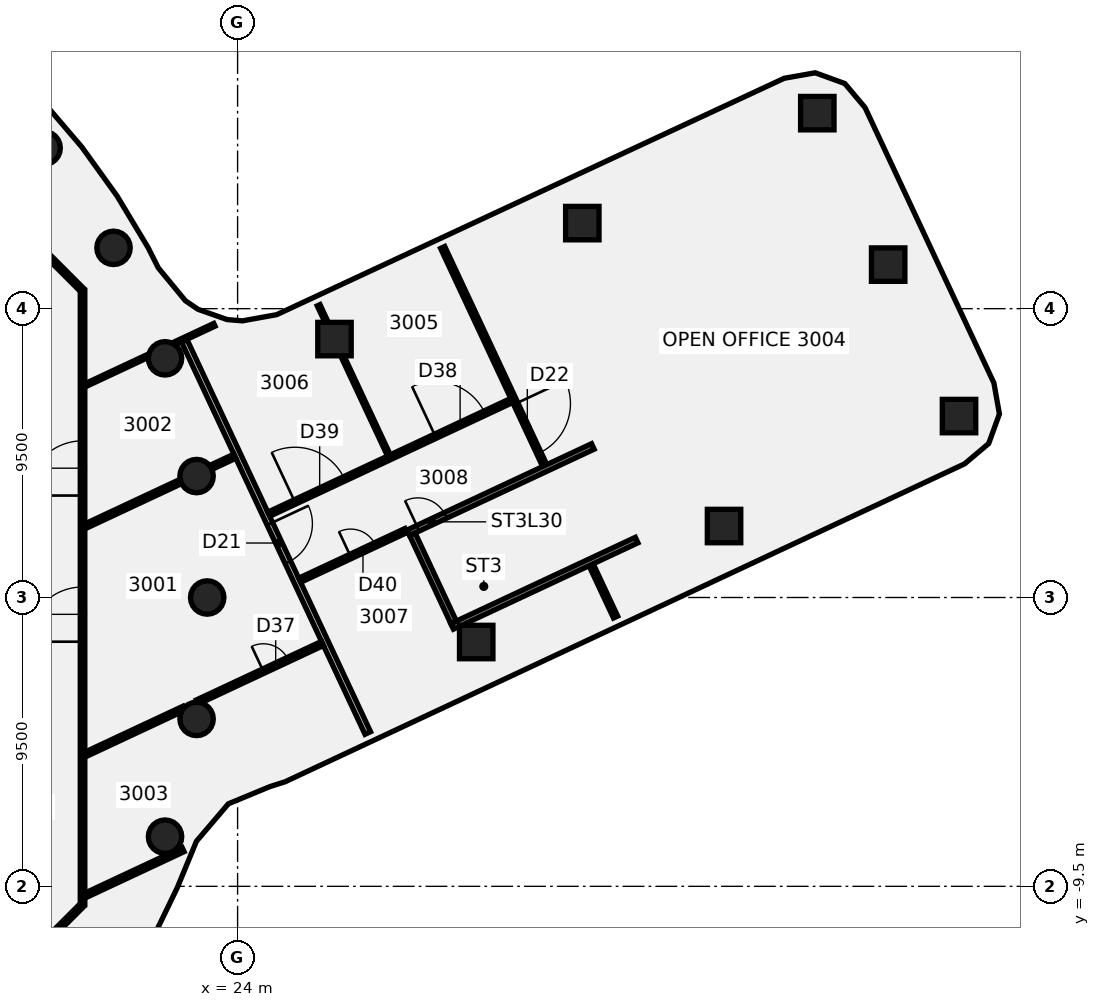
"""IFC4 building model, lengths in metres.
Left out: names, types, materials, properties, quantities, classifications, styles, units other than length and angle.
Written with IfcOpenShell. Run it as: python <this file> out.ifc"""

import sys

from ifc_helpers import new_model, si_unit, direction, frame, frame_2d, origin, origin_2d, place, context, subcontext, project, spatial, polyline, rectangle, circle, outline, extrude, element, fill, save


model = new_model("IFC4")
c1 = context("Model", 3, precision=1e-05, world=origin(), true_north=direction((0.0, 1.0)))
c2 = subcontext(c1, "Body", "Model", "MODEL_VIEW")
j1 = project(units=[si_unit("LENGTHUNIT", "METRE"), si_unit("PLANEANGLEUNIT", "RADIAN")], contexts=[c1])
p1 = place(None, origin())
s1 = spatial("IfcSite", under=j1, at=p1, CompositionType="ELEMENT")
p2 = place(p1, origin())
s2 = spatial("IfcBuilding", under=s1, at=p2, CompositionType="ELEMENT")
p3 = place(p2, frame((0.0, 0.0, 124.75)))
s3 = spatial("IfcBuildingStorey", under=s2, at=p3, CompositionType="ELEMENT", Elevation=124.75)
for number, where, z_axis, x_axis in (
    (1, (23.0, 0.0, -0.14), (0.0, 0.0, 1.0), (1.0, 0.0, 0.0)),
    (2, (22.651, 3.994, -0.14), (0.0, 0.0, 1.0), (1.0, 0.0, 0.0)),
    (3, (21.613, 7.866, -0.14), (0.0, 0.0, 1.0), (1.0, 0.0, 0.0)),
    (4, (19.919, 11.5, -0.14), (0.0, 0.0, 1.0), (1.0, 0.0, 0.0)),
    (5, (17.619, 14.784, -0.14), (0.0, 0.0, 1.0), (1.0, 0.0, 0.0)),
    (6, (21.613, -7.866, -0.14), (0.0, 0.0, 1.0), (1.0, 0.0, 0.0)),
    (7, (22.651, -3.994, -0.14), (0.0, 0.0, 1.0), (1.0, 0.0, 0.0)),
):
    element("IfcColumn", number, at=place(p3, frame(where, z_axis=z_axis, x_axis=x_axis)), inside=s3, PredefinedType="COLUMN", context=c2, shape_type="SweptSolid", body=[
        extrude(circle(Radius=0.55, at=origin_2d()), origin(), (0.0, 0.0, 1.0), 3.71),
    ])
p4 = place(p3, frame((35.338, 12.314, -0.138), z_axis=(-0.060824433029, 0.064699855868, 0.9960493547), x_axis=(0.421197702581, -0.903035286049, 0.084378714676)))
e8 = element("IfcColumn", 8, at=p4, inside=s3, PredefinedType="COLUMN", context=c2, shape_type="SweptSolid", body=[
    extrude(rectangle(XDim=1.1, YDim=1.1, at=origin_2d()), origin(), (0.0, 0.0, 1.0), 3.717),
])
p5 = place(p3, frame((40.0, 2.35, -0.138), z_axis=(-0.012351142794, 0.088034741194, 0.996040829291), x_axis=(-0.905727436668, -0.423052547946, 0.026160125068)))
e9 = element("IfcColumn", 9, at=p5, inside=s3, PredefinedType="COLUMN", context=c2, shape_type="SweptSolid", body=[
    extrude(rectangle(XDim=1.1, YDim=1.1, at=origin_2d()), origin(), (0.0, 0.0, 1.0), 3.716),
])
p6 = place(p3, frame((27.187, 8.499, -0.139), z_axis=(-0.041932325564, 0.025080401947, 0.998805613476), x_axis=(0.422762183328, -0.905336041768, 0.040481944421)))
e10 = element("IfcColumn", 10, at=p6, inside=s3, PredefinedType="COLUMN", context=c2, shape_type="SweptSolid", body=[
    extrude(rectangle(XDim=1.1, YDim=1.1, at=origin_2d()), origin(), (0.0, 0.0, 1.0), 3.709),
])
p7 = place(p3, frame((31.849, -1.464, -0.139), z_axis=(0.00678071338, 0.048386644022, 0.998805664084), x_axis=(-0.905990074096, -0.422461295082, 0.026616532396)))
e11 = element("IfcColumn", 11, at=p7, inside=s3, PredefinedType="COLUMN", context=c2, shape_type="SweptSolid", body=[
    extrude(rectangle(XDim=1.1, YDim=1.1, at=origin_2d()), origin(), (0.0, 0.0, 1.0), 3.708),
])
p8 = place(p3, frame((47.73, 5.967, -0.138), z_axis=(-0.019038669148, 0.130588259864, 0.991253870339), x_axis=(-0.905941901453, -0.421679598548, 0.038152160609)))
e12 = element("IfcColumn", 12, at=p8, inside=s3, PredefinedType="COLUMN", context=c2, shape_type="SweptSolid", body=[
    extrude(rectangle(XDim=1.1, YDim=1.1, at=origin_2d()), origin(), (0.0, 0.0, 1.0), 3.732),
])
p9 = place(p3, frame((45.399, 10.949, -0.138), z_axis=(-0.043196128411, 0.119116596528, 0.991940185153), x_axis=(-0.905970442825, -0.423188341029, 0.011365946715)))
e13 = element("IfcColumn", 13, at=p9, inside=s3, PredefinedType="COLUMN", context=c2, shape_type="SweptSolid", body=[
    extrude(rectangle(XDim=1.1, YDim=1.1, at=origin_2d()), origin(), (0.0, 0.0, 1.0), 3.73),
])
p10 = place(p3, frame((43.068, 15.93, -0.138), z_axis=(-0.067336464177, 0.107515850964, 0.991920431478), x_axis=(0.419376139534, -0.899037513011, 0.125917448308)))
e14 = element("IfcColumn", 14, at=p10, inside=s3, PredefinedType="COLUMN", context=c2, shape_type="SweptSolid", body=[
    extrude(rectangle(XDim=1.1, YDim=1.1, at=origin_2d()), origin(), (0.0, 0.0, 1.0), 3.731),
])
p11 = place(p3, frame((22.246, 8.44, 0.0), z_axis=(0.0, 0.0, 1.0), x_axis=(0.423833272941, -0.905740225864, 0.0)))
e15 = element("IfcWall", 15, at=p11, inside=s3, PredefinedType="PARTITIONING", context=c2, shape_type="SweptSolid", body=[
    extrude(rectangle(XDim=14.239, YDim=0.2, at=frame_2d((7.119, 0.0))), origin(), (0.0, 0.0, 1.0), 2.87),
])
p12 = place(p11, frame((6.64, 0.0, 0.0)))
e16 = element("IfcOpeningElement", 16, at=p12, cuts=e15, PredefinedType="OPENING", context=c2, shape_type="SweptSolid", body=[
    extrude(rectangle(XDim=1.4, YDim=2.1, at=frame_2d((0.7, 1.05))), frame((0.0, 0.11, 0.0), z_axis=(0.0, -1.0, 0.0), x_axis=(1.0, 0.0, 0.0)), (0.0, 0.0, 1.0), 0.22),
])
p13 = place(p3, frame((26.666, 9.613, 0.0), z_axis=(0.0, 0.0, 1.0), x_axis=(0.423519130121, -0.905887159872, 0.0)))
e17 = element("IfcWall", 17, at=p13, inside=s3, PredefinedType="PARTITIONING", context=c2, shape_type="SweptSolid", body=[
    extrude(rectangle(XDim=0.506, YDim=0.1, at=frame_2d((0.253, 0.0))), origin(), (0.0, 0.0, 1.0), 2.97),
])
p14 = place(p3, frame((27.437, 7.964, 0.0), z_axis=(0.0, 0.0, 1.0), x_axis=(0.423841599809, -0.905736329332, 0.0)))
e18 = element("IfcWall", 18, at=p14, inside=s3, PredefinedType="PARTITIONING", context=c2, shape_type="SweptSolid", body=[
    extrude(rectangle(XDim=3.634, YDim=0.1, at=frame_2d((1.817, 0.0))), origin(), (0.0, 0.0, 1.0), 2.97),
])
p15 = place(p3, frame((30.745, 11.513, 0.0), z_axis=(0.0, 0.0, 1.0), x_axis=(0.423744952119, -0.905781549577, 0.0)))
e19 = element("IfcWall", 19, at=p15, inside=s3, PredefinedType="PARTITIONING", context=c2, shape_type="SweptSolid", body=[
    extrude(rectangle(XDim=7.882, YDim=0.15, at=frame_2d((3.941, 0.0))), origin(), (0.0, 0.0, 1.0), 2.97),
])
p16 = place(p15, frame((5.671, 0.0, 0.0)))
e20 = element("IfcOpeningElement", 20, at=p16, cuts=e19, PredefinedType="OPENING", context=c2, shape_type="SweptSolid", body=[
    extrude(rectangle(XDim=1.8, YDim=2.1, at=frame_2d((0.9, 1.05))), frame((0.0, 0.085, 0.0), z_axis=(0.0, -1.0, 0.0), x_axis=(1.0, 0.0, 0.0)), (0.0, 0.0, 1.0), 0.17),
])
p17 = place(p3, frame((35.645, 1.041, 0.0), z_axis=(0.0, 0.0, 1.0), x_axis=(0.423791120389, -0.905759949589, 0.0)))
e21 = element("IfcWall", 21, at=p17, inside=s3, PredefinedType="PARTITIONING", context=c2, shape_type="SweptSolid", body=[
    extrude(rectangle(XDim=1.859, YDim=0.15, at=frame_2d((0.93, 0.0))), origin(), (0.0, 0.0, 1.0), 2.97),
])
p18 = place(p3, frame((17.128, 11.872, 0.0), z_axis=(0.0, 0.0, 1.0), x_axis=(0.707106781187, -0.707106781187, 0.0)))
e22 = element("IfcWall", 22, at=p18, inside=s3, PredefinedType="PARTITIONING", context=c2, shape_type="SweptSolid", body=[
    extrude(rectangle(XDim=2.465, YDim=0.15, at=frame_2d((1.232, 0.0))), origin(), (0.0, 0.0, 1.0), 2.97),
])
p19 = place(p3, frame((18.99, -9.799, 0.0), z_axis=(0.0, 0.0, 1.0), x_axis=(0.905741880745, 0.42382973641, 0.0)))
e23 = element("IfcWall", 23, at=p19, inside=s3, PredefinedType="PARTITIONING", context=c2, shape_type="SweptSolid", body=[
    extrude(rectangle(XDim=3.552, YDim=0.15, at=frame_2d((1.776, 0.0))), origin(), (0.0, 0.0, 1.0), 2.97),
])
p20 = place(p3, frame((18.99, -5.162, 0.0), z_axis=(0.0, 0.0, 1.0), x_axis=(0.905759778977, 0.423791485034, 0.0)))
e24 = element("IfcWall", 24, at=p20, inside=s3, PredefinedType="PARTITIONING", context=c2, shape_type="SweptSolid", body=[
    extrude(rectangle(XDim=3.584, YDim=0.15, at=frame_2d((1.792, 0.0))), origin(), (0.0, 0.0, 1.0), 2.97),
])
p21 = place(p3, frame((22.671, -3.439, 0.0), z_axis=(0.0, 0.0, 1.0), x_axis=(0.905778318348, 0.423751859005, 0.0)))
e25 = element("IfcWall", 25, at=p21, inside=s3, PredefinedType="PARTITIONING", context=c2, shape_type="SweptSolid", body=[
    extrude(rectangle(XDim=4.55, YDim=0.15, at=frame_2d((2.275, 0.0))), origin(), (0.0, 0.0, 1.0), 2.97),
])
p22 = place(p21, frame((2.4, 0.0, 0.0)))
e26 = element("IfcOpeningElement", 26, at=p22, cuts=e25, PredefinedType="OPENING", context=c2, shape_type="SweptSolid", body=[
    extrude(rectangle(XDim=0.9, YDim=2.1, at=frame_2d((0.45, 1.05))), frame((0.0, 0.085, 0.0), z_axis=(0.0, -1.0, 0.0), x_axis=(1.0, 0.0, 0.0)), (0.0, 0.0, 1.0), 0.17),
])
p23 = place(p3, frame((18.99, 2.345, 0.0), z_axis=(0.0, 0.0, 1.0), x_axis=(0.90574646987, 0.423819929118, 0.0)))
e27 = element("IfcWall", 27, at=p23, inside=s3, PredefinedType="PARTITIONING", context=c2, shape_type="SweptSolid", body=[
    extrude(rectangle(XDim=3.475, YDim=0.15, at=frame_2d((1.737, 0.0))), origin(), (0.0, 0.0, 1.0), 2.97),
])
p24 = place(p3, frame((23.128, 4.281, 0.0), z_axis=(0.0, 0.0, 1.0), x_axis=(0.905713311234, 0.423890785289, 0.0)))
e28 = element("IfcWall", 28, at=p24, inside=s3, PredefinedType="PARTITIONING", context=c2, shape_type="SweptSolid", body=[
    extrude(rectangle(XDim=0.864, YDim=0.15, at=frame_2d((0.432, 0.0))), origin(), (0.0, 0.0, 1.0), 2.87),
])
p25 = place(p3, frame((18.977, 6.976, 0.0), z_axis=(0.0, 0.0, 1.0), x_axis=(0.905746977705, 0.423818843822, 0.0)))
e29 = element("IfcWall", 29, at=p25, inside=s3, PredefinedType="PARTITIONING", context=c2, shape_type="SweptSolid", body=[
    extrude(rectangle(XDim=2.319, YDim=0.1, at=frame_2d((1.16, 0.0))), origin(), (0.0, 0.0, 1.0), 2.97),
])
p26 = place(p3, frame((21.9, 8.344, 0.0), z_axis=(0.0, 0.0, 1.0), x_axis=(0.905742946236, 0.423827459403, 0.0)))
e30 = element("IfcWall", 30, at=p26, inside=s3, PredefinedType="PARTITIONING", context=c2, shape_type="SweptSolid", body=[
    extrude(rectangle(XDim=1.475, YDim=0.1, at=frame_2d((0.738, 0.0))), origin(), (0.0, 0.0, 1.0), 2.97),
])
p27 = place(p3, frame((25.028, 2.741, 0.0), z_axis=(0.0, 0.0, 1.0), x_axis=(0.905723688723, 0.423868611347, 0.0)))
e31 = element("IfcWall", 31, at=p27, inside=s3, PredefinedType="PARTITIONING", context=c2, shape_type="SweptSolid", body=[
    extrude(rectangle(XDim=8.821, YDim=0.15, at=frame_2d((4.41, 0.0))), origin(), (0.0, 0.0, 1.0), 2.87),
])
p28 = place(p27, frame((6.045, 0.0, 0.0)))
e32 = element("IfcOpeningElement", 32, at=p28, cuts=e31, PredefinedType="OPENING", context=c2, shape_type="SweptSolid", body=[
    extrude(rectangle(XDim=1.8, YDim=2.1, at=frame_2d((0.9, 1.05))), frame((0.0, 0.085, 0.0), z_axis=(0.0, -1.0, 0.0), x_axis=(1.0, 0.0, 0.0)), (0.0, 0.0, 1.0), 0.17),
])
p29 = place(p27, frame((0.945, 0.0, 0.0)))
e33 = element("IfcOpeningElement", 33, at=p29, cuts=e31, PredefinedType="OPENING", context=c2, shape_type="SweptSolid", body=[
    extrude(rectangle(XDim=1.8, YDim=2.1, at=frame_2d((0.9, 1.05))), frame((0.0, 0.085, 0.0), z_axis=(0.0, -1.0, 0.0), x_axis=(1.0, 0.0, 0.0)), (0.0, 0.0, 1.0), 0.17),
])
p30 = place(p3, frame((26.045, 0.569, 0.0), z_axis=(0.0, 0.0, 1.0), x_axis=(0.90580091822, 0.423703547958, 0.0)))
e34 = element("IfcWall", 34, at=p30, inside=s3, PredefinedType="PARTITIONING", context=c2, shape_type="SweptSolid", body=[
    extrude(rectangle(XDim=3.855, YDim=0.15, at=frame_2d((1.927, 0.0))), origin(), (0.0, 0.0, 1.0), 2.87),
])
p31 = place(p30, frame((1.845, 0.0, 0.0)))
e35 = element("IfcOpeningElement", 35, at=p31, cuts=e34, PredefinedType="OPENING", context=c2, shape_type="SweptSolid", body=[
    extrude(rectangle(XDim=0.9, YDim=2.1, at=frame_2d((0.45, 1.05))), frame((0.0, 0.085, 0.0), z_axis=(0.0, -1.0, 0.0), x_axis=(1.0, 0.0, 0.0)), (0.0, 0.0, 1.0), 0.17),
])
p32 = place(p3, frame((17.1, -11.9, 0.0), z_axis=(0.0, 0.0, 1.0), x_axis=(0.707106781187, 0.707106781187, 0.0)))
e36 = element("IfcWall", 36, at=p32, inside=s3, PredefinedType="PARTITIONING", context=c2, shape_type="SweptSolid", body=[
    extrude(rectangle(XDim=2.505, YDim=0.15, at=frame_2d((1.253, 0.0))), origin(), (0.0, 0.0, 1.0), 2.97),
])
p33 = place(p3, frame((18.9, -10.1, 0.0), z_axis=(0.0, 0.0, 1.0), x_axis=(0.0, 1.0, 0.0)))
e37 = element("IfcWall", 37, at=p33, inside=s3, PredefinedType="PARTITIONING", context=c2, shape_type="SweptSolid", body=[
    extrude(rectangle(XDim=20.2, YDim=0.15, at=frame_2d((10.1, 0.0))), origin(), (0.0, 0.0, 1.0), 2.97),
])
p34 = place(p33, frame((8.646, 0.0, 0.0)))
e38 = element("IfcOpeningElement", 38, at=p34, cuts=e37, PredefinedType="OPENING", context=c2, shape_type="SweptSolid", body=[
    extrude(rectangle(XDim=1.8, YDim=2.1, at=frame_2d((0.9, 1.05))), frame((0.0, 0.085, 0.0), z_axis=(0.0, -1.0, 0.0), x_axis=(1.0, 0.0, 0.0)), (0.0, 0.0, 1.0), 0.17),
])
p35 = place(p33, frame((13.453, 0.0, 0.0)))
e39 = element("IfcOpeningElement", 39, at=p35, cuts=e37, PredefinedType="OPENING", context=c2, shape_type="SweptSolid", body=[
    extrude(rectangle(XDim=1.8, YDim=2.1, at=frame_2d((0.9, 1.05))), frame((0.0, 0.085, 0.0), z_axis=(0.0, -1.0, 0.0), x_axis=(1.0, 0.0, 0.0)), (0.0, 0.0, 1.0), 0.17),
])
p36 = place(p3, frame((29.616, 2.128, -0.14), z_axis=(0.0, 0.0, 1.0), x_axis=(0.90574886028, 0.42381482053, 0.0)))
e40 = element("IfcWall", 40, at=p36, inside=s3, PredefinedType="SHEAR", context=c2, shape_type="SweptSolid", body=[
    extrude(rectangle(XDim=6.7, YDim=0.2, at=frame_2d((3.35, 0.0))), origin(), (0.0, 0.0, 1.0), 3.01),
])
p37 = place(p36, frame((0.35, 0.0, 0.0)))
e41 = element("IfcOpeningElement", 41, at=p37, cuts=e40, PredefinedType="OPENING", context=c2, shape_type="SweptSolid", body=[
    extrude(rectangle(XDim=1.0, YDim=2.1, at=frame_2d((0.5, 1.05))), frame((0.0, 0.11, 0.0), z_axis=(0.0, -1.0, 0.0), x_axis=(1.0, 0.0, 0.0)), (0.0, 0.0, 1.0), 0.22),
])
p38 = place(p3, frame((31.057, -0.951, -0.14), z_axis=(0.0, 0.0, 1.0), x_axis=(0.90574231493, 0.423828808535, 0.0)))
e42 = element("IfcWall", 42, at=p38, inside=s3, PredefinedType="SHEAR", context=c2, shape_type="SweptSolid", body=[
    extrude(rectangle(XDim=6.7, YDim=0.2, at=frame_2d((3.35, 0.0))), origin(), (0.0, 0.0, 1.0), 3.01),
])
p39 = place(p3, frame((31.105, -0.818, -0.14), z_axis=(0.0, 0.0, 1.0), x_axis=(-0.423808281325, 0.905751920053, 0.0)))
e43 = element("IfcWall", 43, at=p39, inside=s3, PredefinedType="SHEAR", context=c2, shape_type="SweptSolid", body=[
    extrude(rectangle(XDim=3.2, YDim=0.2, at=frame_2d((1.6, 0.0))), origin(), (0.0, 0.0, 1.0), 3.01),
])
p40 = place(p3, frame((0.0, 0.0, -0.14)))
e44 = element("IfcWall", 44, at=p40, inside=s3, PredefinedType="SHEAR", context=c2, shape_type="SweptSolid", body=[
    extrude(outline(polyline([(36.902, 1.894), (37.083, 1.979), (35.727, 4.877), (35.546, 4.792), (36.902, 1.894)])), origin(), (0.0, 0.0, 1.0), 3.01),
])
p41 = place(p12, frame((1.4, 0.0, 0.0), z_axis=(0.0, 0.0, 1.0), x_axis=(-1.0, 0.0, 0.0)))
e45 = element("IfcDoor", 45, at=p41, inside=s3, OperationType="DOUBLE_DOOR_SINGLE_SWING", PredefinedType="DOOR", context=c2, shape_type="SweptSolid", body=[
    extrude(rectangle(XDim=1.4, YDim=2.1, at=frame_2d((0.7, 1.05))), frame((0.0, 0.025, 0.0), z_axis=(0.0, -1.0, 0.0), x_axis=(1.0, 0.0, 0.0)), (0.0, 0.0, 1.0), 0.05),
])
fill(e16, e45)
p42 = place(p16, origin())
e46 = element("IfcDoor", 46, at=p42, inside=s3, OperationType="DOUBLE_DOOR_SINGLE_SWING", PredefinedType="DOOR", context=c2, shape_type="SweptSolid", body=[
    extrude(rectangle(XDim=1.8, YDim=2.1, at=frame_2d((0.9, 1.05))), frame((0.0, 0.025, 0.0), z_axis=(0.0, -1.0, 0.0), x_axis=(1.0, 0.0, 0.0)), (0.0, 0.0, 1.0), 0.05),
])
fill(e20, e46)
p43 = place(p22, frame((0.9, 0.0, 0.0), z_axis=(0.0, 0.0, 1.0), x_axis=(-1.0, 0.0, 0.0)))
e47 = element("IfcDoor", 47, at=p43, inside=s3, OperationType="SINGLE_SWING_RIGHT", PredefinedType="DOOR", context=c2, shape_type="SweptSolid", body=[
    extrude(rectangle(XDim=0.9, YDim=2.1, at=frame_2d((0.45, 1.05))), frame((0.0, 0.025, 0.0), z_axis=(0.0, -1.0, 0.0), x_axis=(1.0, 0.0, 0.0)), (0.0, 0.0, 1.0), 0.05),
])
fill(e26, e47)
p44 = place(p28, origin())
e48 = element("IfcDoor", 48, at=p44, inside=s3, OperationType="DOUBLE_DOOR_SINGLE_SWING", PredefinedType="DOOR", context=c2, shape_type="SweptSolid", body=[
    extrude(rectangle(XDim=1.8, YDim=2.1, at=frame_2d((0.9, 1.05))), frame((0.0, 0.025, 0.0), z_axis=(0.0, -1.0, 0.0), x_axis=(1.0, 0.0, 0.0)), (0.0, 0.0, 1.0), 0.05),
])
fill(e32, e48)
p45 = place(p29, origin())
e49 = element("IfcDoor", 49, at=p45, inside=s3, OperationType="DOUBLE_DOOR_SINGLE_SWING", PredefinedType="DOOR", context=c2, shape_type="SweptSolid", body=[
    extrude(rectangle(XDim=1.8, YDim=2.1, at=frame_2d((0.9, 1.05))), frame((0.0, 0.025, 0.0), z_axis=(0.0, -1.0, 0.0), x_axis=(1.0, 0.0, 0.0)), (0.0, 0.0, 1.0), 0.05),
])
fill(e33, e49)
p46 = place(p31, frame((0.9, 0.0, 0.0), z_axis=(0.0, 0.0, 1.0), x_axis=(-1.0, 0.0, 0.0)))
e50 = element("IfcDoor", 50, at=p46, inside=s3, OperationType="SINGLE_SWING_RIGHT", PredefinedType="DOOR", context=c2, shape_type="SweptSolid", body=[
    extrude(rectangle(XDim=0.9, YDim=2.1, at=frame_2d((0.45, 1.05))), frame((0.0, 0.025, 0.0), z_axis=(0.0, -1.0, 0.0), x_axis=(1.0, 0.0, 0.0)), (0.0, 0.0, 1.0), 0.05),
])
fill(e35, e50)
p47 = place(p34, origin())
e51 = element("IfcDoor", 51, at=p47, inside=s3, OperationType="DOUBLE_DOOR_SINGLE_SWING", PredefinedType="DOOR", context=c2, shape_type="SweptSolid", body=[
    extrude(rectangle(XDim=1.8, YDim=2.1, at=frame_2d((0.9, 1.05))), frame((0.0, 0.025, 0.0), z_axis=(0.0, -1.0, 0.0), x_axis=(1.0, 0.0, 0.0)), (0.0, 0.0, 1.0), 0.05),
])
fill(e38, e51)
p48 = place(p35, frame((1.8, 0.0, 0.0), z_axis=(0.0, 0.0, 1.0), x_axis=(-1.0, 0.0, 0.0)))
e52 = element("IfcDoor", 52, at=p48, inside=s3, OperationType="DOUBLE_DOOR_SINGLE_SWING", PredefinedType="DOOR", context=c2, shape_type="SweptSolid", body=[
    extrude(rectangle(XDim=1.8, YDim=2.1, at=frame_2d((0.9, 1.05))), frame((0.0, 0.025, 0.0), z_axis=(0.0, -1.0, 0.0), x_axis=(1.0, 0.0, 0.0)), (0.0, 0.0, 1.0), 0.05),
])
fill(e39, e52)
p49 = place(p37, origin())
e53 = element("IfcDoor", 53, at=p49, inside=s3, OperationType="SINGLE_SWING_LEFT", PredefinedType="DOOR", context=c2, shape_type="SweptSolid", body=[
    extrude(rectangle(XDim=1.0, YDim=2.1, at=frame_2d((0.5, 1.05))), frame((0.0, 0.025, 0.0), z_axis=(0.0, -1.0, 0.0), x_axis=(1.0, 0.0, 0.0)), (0.0, 0.0, 1.0), 0.05),
])
fill(e41, e53)
save(model, sys.argv[1])
